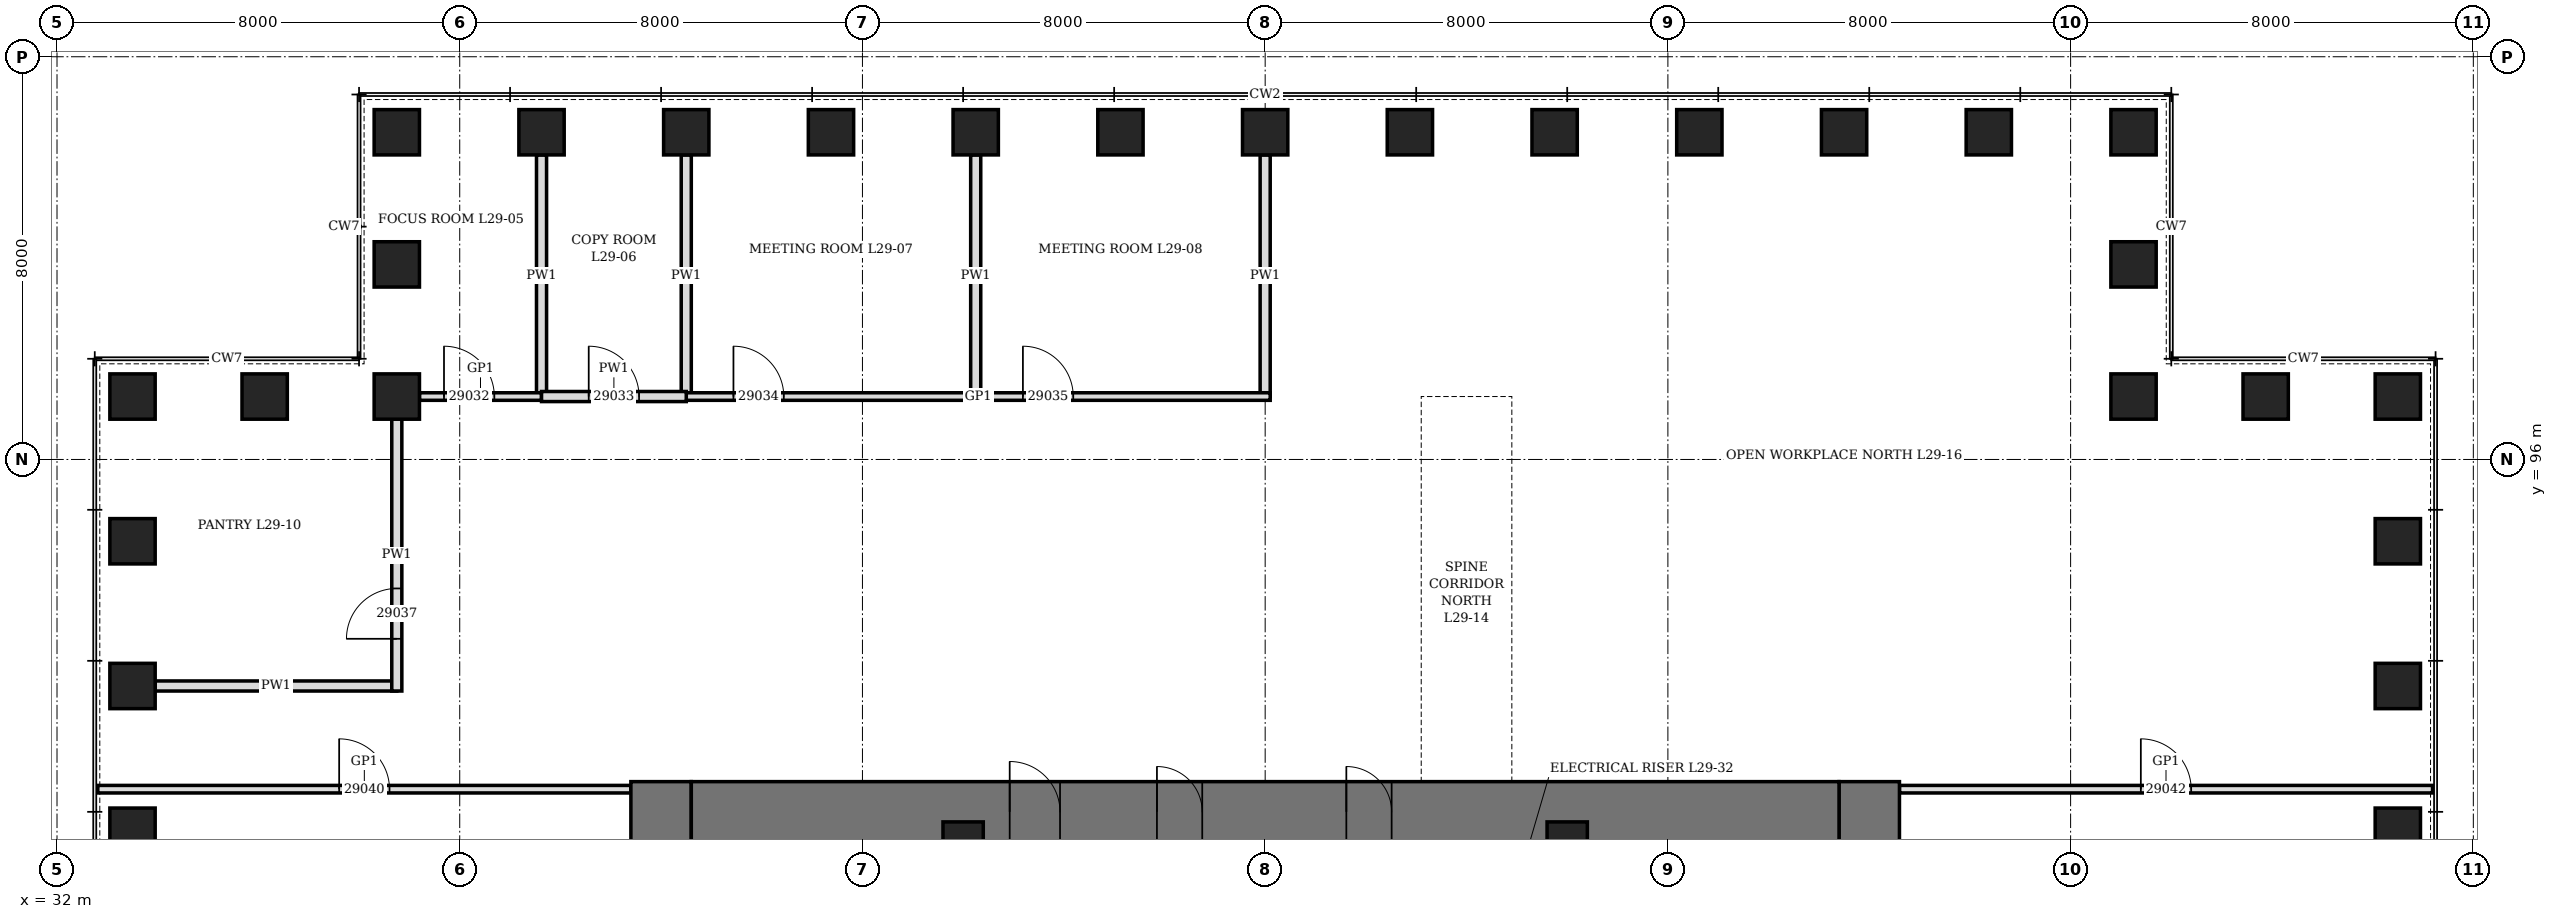
"""IFC4 building model, lengths in metres.
Left out: names, types, materials, properties, quantities, classifications, styles, units other than length and angle.
Written with IfcOpenShell. Run it as: python <this file> out.ifc"""

import sys

from ifc_helpers import new_model, si_unit, direction, frame, frame_2d, origin, origin_2d, place, context, subcontext, project, spatial, rectangle, hollow_rectangle, extrude, element, fill, save


model = new_model("IFC4")
c1 = context("Model", 3, precision=1e-05, world=origin(), true_north=direction((0.0, 1.0)))
c2 = subcontext(c1, "Body", "Model", "MODEL_VIEW")
j1 = project(units=[si_unit("LENGTHUNIT", "METRE"), si_unit("PLANEANGLEUNIT", "RADIAN")], contexts=[c1])
p1 = place(None, origin())
s1 = spatial("IfcSite", under=j1, at=p1, CompositionType="ELEMENT")
p2 = place(p1, origin())
s2 = spatial("IfcBuilding", under=s1, at=p2, CompositionType="ELEMENT")
p3 = place(p2, frame((0.0, 0.0, 133.3)))
s3 = spatial("IfcBuildingStorey", under=s2, at=p3, CompositionType="ELEMENT", Elevation=133.3)
for number, where, z_axis, x_axis in (
    (1, (78.5, 88.625, 0.0), (0.0, 0.0, 1.0), (0.0, 1.0, 0.0)),
    (2, (78.5, 91.5, 0.0), (0.0, 0.0, 1.0), (0.0, 1.0, 0.0)),
    (3, (78.5, 94.375, 0.0), (0.0, 0.0, 1.0), (0.0, 1.0, 0.0)),
    (4, (78.5, 97.25, 0.0), (0.0, 0.0, 1.0), (1.0, 0.0, 0.0)),
    (5, (75.875, 97.25, 0.0), (0.0, 0.0, 1.0), (1.0, 0.0, 0.0)),
    (6, (73.25, 97.25, 0.0), (0.0, 0.0, 1.0), (0.0, 1.0, 0.0)),
    (7, (73.25, 99.875, 0.0), (0.0, 0.0, 1.0), (0.0, 1.0, 0.0)),
    (8, (73.25, 102.5, 0.0), (0.0, 0.0, 1.0), (1.0, 0.0, 0.0)),
    (9, (70.375, 102.5, 0.0), (0.0, 0.0, 1.0), (1.0, 0.0, 0.0)),
    (10, (67.5, 102.5, 0.0), (0.0, 0.0, 1.0), (1.0, 0.0, 0.0)),
    (11, (64.625, 102.5, 0.0), (0.0, 0.0, 1.0), (1.0, 0.0, 0.0)),
    (12, (61.75, 102.5, 0.0), (0.0, 0.0, 1.0), (1.0, 0.0, 0.0)),
    (13, (58.875, 102.5, 0.0), (0.0, 0.0, 1.0), (1.0, 0.0, 0.0)),
    (14, (56.0, 102.5, 0.0), (0.0, 0.0, 1.0), (1.0, 0.0, 0.0)),
    (15, (53.125, 102.5, 0.0), (0.0, 0.0, 1.0), (1.0, 0.0, 0.0)),
    (16, (50.25, 102.5, 0.0), (0.0, 0.0, 1.0), (1.0, 0.0, 0.0)),
    (17, (47.375, 102.5, 0.0), (0.0, 0.0, 1.0), (1.0, 0.0, 0.0)),
    (18, (44.5, 102.5, 0.0), (0.0, 0.0, 1.0), (1.0, 0.0, 0.0)),
    (19, (41.625, 102.5, 0.0), (0.0, 0.0, 1.0), (1.0, 0.0, 0.0)),
    (20, (38.75, 102.5, 0.0), (0.0, 0.0, 1.0), (0.0, 1.0, 0.0)),
    (21, (38.75, 99.875, 0.0), (0.0, 0.0, 1.0), (0.0, 1.0, 0.0)),
    (22, (38.75, 97.25, 0.0), (0.0, 0.0, 1.0), (1.0, 0.0, 0.0)),
    (23, (36.125, 97.25, 0.0), (0.0, 0.0, 1.0), (1.0, 0.0, 0.0)),
    (24, (33.5, 97.25, 0.0), (0.0, 0.0, 1.0), (0.0, 1.0, 0.0)),
    (25, (33.5, 94.375, 0.0), (0.0, 0.0, 1.0), (0.0, 1.0, 0.0)),
    (26, (33.5, 91.5, 0.0), (0.0, 0.0, 1.0), (0.0, 1.0, 0.0)),
    (27, (33.5, 88.625, 0.0), (0.0, 0.0, 1.0), (0.0, 1.0, 0.0)),
):
    element("IfcColumn", number, at=place(p3, frame(where, z_axis=z_axis, x_axis=x_axis)), inside=s3, PredefinedType="COLUMN", context=c2, shape_type="SweptSolid", body=[
        extrude(hollow_rectangle(XDim=0.9, YDim=0.9, WallThickness=0.15, at=origin_2d()), origin(), (0.0, 0.0, 1.0), 4.2),
    ])
p4 = place(p3, frame((44.0, 70.4, 0.0), z_axis=(0.0, 0.0, 1.0), x_axis=(0.0, 1.0, 0.0)))
e28 = element("IfcWall", 28, at=p4, inside=s3, PredefinedType="SHEAR", context=c2, shape_type="SweptSolid", body=[
    extrude(rectangle(XDim=19.2, YDim=1.2, at=frame_2d((9.6, 0.0))), origin(), (0.0, 0.0, 1.0), 4.2),
])
p5 = place(p4, frame((8.6, 0.0, 0.0)))
e29 = element("IfcOpeningElement", 29, at=p5, cuts=e28, PredefinedType="OPENING", context=c2, shape_type="SweptSolid", body=[
    extrude(rectangle(XDim=2.0, YDim=2.4, at=frame_2d((1.0, 1.2))), frame((0.0, 0.61, 0.0), z_axis=(0.0, -1.0, 0.0), x_axis=(1.0, 0.0, 0.0)), (0.0, 0.0, 1.0), 1.22),
])
p6 = place(p3, frame((68.0, 70.4, 0.0), z_axis=(0.0, 0.0, 1.0), x_axis=(0.0, 1.0, 0.0)))
e30 = element("IfcWall", 30, at=p6, inside=s3, PredefinedType="SHEAR", context=c2, shape_type="SweptSolid", body=[
    extrude(rectangle(XDim=19.2, YDim=1.2, at=frame_2d((9.6, 0.0))), origin(), (0.0, 0.0, 1.0), 4.2),
])
p7 = place(p6, frame((8.6, 0.0, 0.0)))
e31 = element("IfcOpeningElement", 31, at=p7, cuts=e30, PredefinedType="OPENING", context=c2, shape_type="SweptSolid", body=[
    extrude(rectangle(XDim=2.0, YDim=2.4, at=frame_2d((1.0, 1.2))), frame((0.0, 0.61, 0.0), z_axis=(0.0, -1.0, 0.0), x_axis=(1.0, 0.0, 0.0)), (0.0, 0.0, 1.0), 1.22),
])
p8 = place(p3, frame((44.6, 89.0, 0.0), z_axis=(0.0, 0.0, 1.0), x_axis=(1.0, 0.0, 0.0)))
e32 = element("IfcWall", 32, at=p8, inside=s3, PredefinedType="SHEAR", context=c2, shape_type="SweptSolid", body=[
    extrude(rectangle(XDim=22.8, YDim=1.2, at=frame_2d((11.4, 0.0))), origin(), (0.0, 0.0, 1.0), 4.2),
])
p9 = place(p8, frame((6.325, 0.0, 0.0)))
e33 = element("IfcOpeningElement", 33, at=p9, cuts=e32, PredefinedType="OPENING", context=c2, shape_type="SweptSolid", body=[
    extrude(rectangle(XDim=1.0, YDim=2.1, at=frame_2d((0.5, 1.05))), frame((0.0, 0.61, 0.0), z_axis=(0.0, -1.0, 0.0), x_axis=(1.0, 0.0, 0.0)), (0.0, 0.0, 1.0), 1.22),
])
p10 = place(p8, frame((9.25, 0.0, 0.0)))
e34 = element("IfcOpeningElement", 34, at=p10, cuts=e32, PredefinedType="OPENING", context=c2, shape_type="SweptSolid", body=[
    extrude(rectangle(XDim=0.9, YDim=2.1, at=frame_2d((0.45, 1.05))), frame((0.0, 0.61, 0.0), z_axis=(0.0, -1.0, 0.0), x_axis=(1.0, 0.0, 0.0)), (0.0, 0.0, 1.0), 1.22),
])
p11 = place(p8, frame((13.012, 0.0, 0.0)))
e35 = element("IfcOpeningElement", 35, at=p11, cuts=e32, PredefinedType="OPENING", context=c2, shape_type="SweptSolid", body=[
    extrude(rectangle(XDim=0.9, YDim=2.1, at=frame_2d((0.45, 1.05))), frame((0.0, 0.61, 0.0), z_axis=(0.0, -1.0, 0.0), x_axis=(1.0, 0.0, 0.0)), (0.0, 0.0, 1.0), 1.22),
])
for number, where, z_axis, x_axis in (
    (36, (50.0, 88.4, 0.0), (0.0, 0.0, 1.0), (1.0, 0.0, 0.0)),
    (37, (62.0, 88.4, 0.0), (0.0, 0.0, 1.0), (1.0, 0.0, 0.0)),
):
    element("IfcColumn", number, at=place(p3, frame(where, z_axis=z_axis, x_axis=x_axis)), inside=s3, PredefinedType="COLUMN", context=c2, shape_type="SweptSolid", body=[
        extrude(hollow_rectangle(XDim=0.8, YDim=0.8, WallThickness=0.1, at=origin_2d()), origin(), (0.0, 0.0, 1.0), 4.2),
    ])
p12 = place(p3, frame((41.625, 97.25, 0.0), z_axis=(0.0, 0.0, 1.0), x_axis=(0.0, 1.0, 0.0)))
e38 = element("IfcWall", 38, at=p12, inside=s3, PredefinedType="PARTITIONING", context=c2, shape_type="SweptSolid", body=[
    extrude(rectangle(XDim=4.8, YDim=0.2, at=frame_2d((2.4, 0.0))), origin(), (0.0, 0.0, 1.0), 3.428),
])
p13 = place(p3, frame((44.5, 97.25, 0.0), z_axis=(0.0, 0.0, 1.0), x_axis=(0.0, 1.0, 0.0)))
e39 = element("IfcWall", 39, at=p13, inside=s3, PredefinedType="PARTITIONING", context=c2, shape_type="SweptSolid", body=[
    extrude(rectangle(XDim=4.8, YDim=0.2, at=frame_2d((2.4, 0.0))), origin(), (0.0, 0.0, 1.0), 2.74),
])
for number, where, z_axis, x_axis in (
    (40, (50.25, 97.25, 0.0), (0.0, 0.0, 1.0), (0.0, 1.0, 0.0)),
    (41, (56.0, 97.25, 0.0), (0.0, 0.0, 1.0), (0.0, 1.0, 0.0)),
):
    element("IfcWall", number, at=place(p3, frame(where, z_axis=z_axis, x_axis=x_axis)), inside=s3, PredefinedType="PARTITIONING", context=c2, shape_type="SweptSolid", body=[
        extrude(rectangle(XDim=4.8, YDim=0.2, at=frame_2d((2.4, 0.0))), origin(), (0.0, 0.0, 1.0), 3.278),
    ])
p14 = place(p3, frame((33.95, 91.5, 0.0), z_axis=(0.0, 0.0, 1.0), x_axis=(1.0, 0.0, 0.0)))
e42 = element("IfcWall", 42, at=p14, inside=s3, PredefinedType="PARTITIONING", context=c2, shape_type="SweptSolid", body=[
    extrude(rectangle(XDim=4.8, YDim=0.2, at=frame_2d((2.4, 0.0))), origin(), (0.0, 0.0, 1.0), 3.428),
])
p15 = place(p3, frame((32.81, 89.45, 0.0), z_axis=(0.0, 0.0, 1.0), x_axis=(1.0, 0.0, 0.0)))
e43 = element("IfcWall", 43, at=p15, inside=s3, PredefinedType="PARTITIONING", context=c2, shape_type="SweptSolid", body=[
    extrude(rectangle(XDim=10.59, YDim=0.15, at=frame_2d((5.295, 0.0))), origin(), (0.0, 0.0, 1.0), 4.04),
])
p16 = place(p15, frame((4.795, 0.0, 0.0)))
e44 = element("IfcOpeningElement", 44, at=p16, cuts=e43, PredefinedType="OPENING", context=c2, shape_type="SweptSolid", body=[
    extrude(rectangle(XDim=1.0, YDim=2.4, at=frame_2d((0.5, 1.2))), frame((0.0, 0.085, 0.0), z_axis=(0.0, -1.0, 0.0), x_axis=(1.0, 0.0, 0.0)), (0.0, 0.0, 1.0), 0.17),
])
p17 = place(p3, frame((68.6, 89.45, 0.0), z_axis=(0.0, 0.0, 1.0), x_axis=(1.0, 0.0, 0.0)))
e45 = element("IfcWall", 45, at=p17, inside=s3, PredefinedType="PARTITIONING", context=c2, shape_type="SweptSolid", body=[
    extrude(rectangle(XDim=10.59, YDim=0.15, at=frame_2d((5.295, 0.0))), origin(), (0.0, 0.0, 1.0), 4.04),
])
p18 = place(p17, frame((4.795, 0.0, 0.0)))
e46 = element("IfcOpeningElement", 46, at=p18, cuts=e45, PredefinedType="OPENING", context=c2, shape_type="SweptSolid", body=[
    extrude(rectangle(XDim=1.0, YDim=2.4, at=frame_2d((0.5, 1.2))), frame((0.0, 0.085, 0.0), z_axis=(0.0, -1.0, 0.0), x_axis=(1.0, 0.0, 0.0)), (0.0, 0.0, 1.0), 0.17),
])
p19 = place(p3, frame((39.2, 97.25, 0.0), z_axis=(0.0, 0.0, 1.0), x_axis=(1.0, 0.0, 0.0)))
e47 = element("IfcWall", 47, at=p19, inside=s3, PredefinedType="PARTITIONING", context=c2, shape_type="SweptSolid", body=[
    extrude(rectangle(XDim=2.425, YDim=0.15, at=frame_2d((1.212, 0.0))), origin(), (0.0, 0.0, 1.0), 4.04),
])
p20 = place(p19, frame((0.488, 0.0, 0.0)))
e48 = element("IfcOpeningElement", 48, at=p20, cuts=e47, PredefinedType="OPENING", context=c2, shape_type="SweptSolid", body=[
    extrude(rectangle(XDim=1.0, YDim=2.4, at=frame_2d((0.5, 1.2))), frame((0.0, 0.085, 0.0), z_axis=(0.0, -1.0, 0.0), x_axis=(1.0, 0.0, 0.0)), (0.0, 0.0, 1.0), 0.17),
])
p21 = place(p3, frame((44.5, 97.25, 0.0), z_axis=(0.0, 0.0, 1.0), x_axis=(1.0, 0.0, 0.0)))
e49 = element("IfcWall", 49, at=p21, inside=s3, PredefinedType="PARTITIONING", context=c2, shape_type="SweptSolid", body=[
    extrude(rectangle(XDim=11.6, YDim=0.15, at=frame_2d((5.8, 0.0))), origin(), (0.0, 0.0, 1.0), 4.04),
])
p22 = place(p21, frame((0.938, 0.0, 0.0)))
e50 = element("IfcOpeningElement", 50, at=p22, cuts=e49, PredefinedType="OPENING", context=c2, shape_type="SweptSolid", body=[
    extrude(rectangle(XDim=1.0, YDim=2.4, at=frame_2d((0.5, 1.2))), frame((0.0, 0.085, 0.0), z_axis=(0.0, -1.0, 0.0), x_axis=(1.0, 0.0, 0.0)), (0.0, 0.0, 1.0), 0.17),
])
p23 = place(p21, frame((6.688, 0.0, 0.0)))
e51 = element("IfcOpeningElement", 51, at=p23, cuts=e49, PredefinedType="OPENING", context=c2, shape_type="SweptSolid", body=[
    extrude(rectangle(XDim=1.0, YDim=2.4, at=frame_2d((0.5, 1.2))), frame((0.0, 0.085, 0.0), z_axis=(0.0, -1.0, 0.0), x_axis=(1.0, 0.0, 0.0)), (0.0, 0.0, 1.0), 0.17),
])
p24 = place(p3, frame((41.625, 97.25, 0.0), z_axis=(0.0, 0.0, 1.0), x_axis=(1.0, 0.0, 0.0)))
e52 = element("IfcWall", 52, at=p24, inside=s3, PredefinedType="PARTITIONING", context=c2, shape_type="SweptSolid", body=[
    extrude(rectangle(XDim=2.875, YDim=0.2, at=frame_2d((1.438, 0.0))), origin(), (0.0, 0.0, 1.0), 4.04),
])
p25 = place(p24, frame((0.938, 0.0, 0.0)))
e53 = element("IfcOpeningElement", 53, at=p25, cuts=e52, PredefinedType="OPENING", context=c2, shape_type="SweptSolid", body=[
    extrude(rectangle(XDim=1.0, YDim=2.1, at=frame_2d((0.5, 1.05))), frame((0.0, 0.11, 0.0), z_axis=(0.0, -1.0, 0.0), x_axis=(1.0, 0.0, 0.0)), (0.0, 0.0, 1.0), 0.22),
])
p26 = place(p3, frame((38.75, 91.4, 0.0), z_axis=(0.0, 0.0, 1.0), x_axis=(0.0, 1.0, 0.0)))
e54 = element("IfcWall", 54, at=p26, inside=s3, PredefinedType="PARTITIONING", context=c2, shape_type="SweptSolid", body=[
    extrude(rectangle(XDim=5.4, YDim=0.2, at=frame_2d((2.7, 0.0))), origin(), (0.0, 0.0, 1.0), 4.04),
])
p27 = place(p26, frame((1.038, 0.0, 0.0)))
e55 = element("IfcOpeningElement", 55, at=p27, cuts=e54, PredefinedType="OPENING", context=c2, shape_type="SweptSolid", body=[
    extrude(rectangle(XDim=1.0, YDim=2.1, at=frame_2d((0.5, 1.05))), frame((0.0, 0.11, 0.0), z_axis=(0.0, -1.0, 0.0), x_axis=(1.0, 0.0, 0.0)), (0.0, 0.0, 1.0), 0.22),
])
p28 = place(p9, origin())
e56 = element("IfcDoor", 56, at=p28, inside=s3, OperationType="SINGLE_SWING_LEFT", PredefinedType="DOOR", context=c2, shape_type="SweptSolid", body=[
    extrude(rectangle(XDim=1.0, YDim=2.1, at=frame_2d((0.5, 1.05))), frame((0.0, 0.35, 0.0), z_axis=(0.0, -1.0, 0.0), x_axis=(1.0, 0.0, 0.0)), (0.0, 0.0, 1.0), 0.7),
])
fill(e33, e56)
p29 = place(p10, origin())
e57 = element("IfcDoor", 57, at=p29, inside=s3, OperationType="SINGLE_SWING_LEFT", PredefinedType="DOOR", context=c2, shape_type="SweptSolid", body=[
    extrude(rectangle(XDim=0.9, YDim=2.1, at=frame_2d((0.45, 1.05))), frame((0.0, 0.35, 0.0), z_axis=(0.0, -1.0, 0.0), x_axis=(1.0, 0.0, 0.0)), (0.0, 0.0, 1.0), 0.7),
])
fill(e34, e57)
p30 = place(p11, origin())
e58 = element("IfcDoor", 58, at=p30, inside=s3, OperationType="SINGLE_SWING_LEFT", PredefinedType="DOOR", context=c2, shape_type="SweptSolid", body=[
    extrude(rectangle(XDim=0.9, YDim=2.1, at=frame_2d((0.45, 1.05))), frame((0.0, 0.35, 0.0), z_axis=(0.0, -1.0, 0.0), x_axis=(1.0, 0.0, 0.0)), (0.0, 0.0, 1.0), 0.7),
])
fill(e35, e58)
p31 = place(p20, origin())
e59 = element("IfcDoor", 59, at=p31, inside=s3, OperationType="SINGLE_SWING_RIGHT", PredefinedType="DOOR", context=c2, shape_type="SweptSolid", body=[
    extrude(rectangle(XDim=1.0, YDim=2.4, at=frame_2d((0.5, 1.2))), frame((0.0, 0.075, 0.0), z_axis=(0.0, -1.0, 0.0), x_axis=(1.0, 0.0, 0.0)), (0.0, 0.0, 1.0), 0.149),
])
fill(e48, e59)
p32 = place(p25, origin())
e60 = element("IfcDoor", 60, at=p32, inside=s3, OperationType="SINGLE_SWING_LEFT", PredefinedType="DOOR", context=c2, shape_type="SweptSolid", body=[
    extrude(rectangle(XDim=1.0, YDim=2.1, at=frame_2d((0.5, 1.05))), frame((0.0, 0.1, 0.0), z_axis=(0.0, -1.0, 0.0), x_axis=(1.0, 0.0, 0.0)), (0.0, 0.0, 1.0), 0.199),
])
fill(e53, e60)
p33 = place(p22, origin())
e61 = element("IfcDoor", 61, at=p33, inside=s3, OperationType="SINGLE_SWING_RIGHT", PredefinedType="DOOR", context=c2, shape_type="SweptSolid", body=[
    extrude(rectangle(XDim=1.0, YDim=2.4, at=frame_2d((0.5, 1.2))), frame((0.0, 0.075, 0.0), z_axis=(0.0, -1.0, 0.0), x_axis=(1.0, 0.0, 0.0)), (0.0, 0.0, 1.0), 0.149),
])
fill(e50, e61)
p34 = place(p23, origin())
e62 = element("IfcDoor", 62, at=p34, inside=s3, OperationType="SINGLE_SWING_RIGHT", PredefinedType="DOOR", context=c2, shape_type="SweptSolid", body=[
    extrude(rectangle(XDim=1.0, YDim=2.4, at=frame_2d((0.5, 1.2))), frame((0.0, 0.075, 0.0), z_axis=(0.0, -1.0, 0.0), x_axis=(1.0, 0.0, 0.0)), (0.0, 0.0, 1.0), 0.149),
])
fill(e51, e62)
p35 = place(p27, origin())
e63 = element("IfcDoor", 63, at=p35, inside=s3, OperationType="SINGLE_SWING_LEFT", PredefinedType="DOOR", context=c2, shape_type="SweptSolid", body=[
    extrude(rectangle(XDim=1.0, YDim=2.1, at=frame_2d((0.5, 1.05))), frame((0.0, 0.1, 0.0), z_axis=(0.0, -1.0, 0.0), x_axis=(1.0, 0.0, 0.0)), (0.0, 0.0, 1.0), 0.199),
])
fill(e55, e63)
p36 = place(p16, origin())
e64 = element("IfcDoor", 64, at=p36, inside=s3, OperationType="SINGLE_SWING_RIGHT", PredefinedType="DOOR", context=c2, shape_type="SweptSolid", body=[
    extrude(rectangle(XDim=1.0, YDim=2.4, at=frame_2d((0.5, 1.2))), frame((0.0, 0.075, 0.0), z_axis=(0.0, -1.0, 0.0), x_axis=(1.0, 0.0, 0.0)), (0.0, 0.0, 1.0), 0.149),
])
fill(e44, e64)
p37 = place(p18, origin())
e65 = element("IfcDoor", 65, at=p37, inside=s3, OperationType="SINGLE_SWING_RIGHT", PredefinedType="DOOR", context=c2, shape_type="SweptSolid", body=[
    extrude(rectangle(XDim=1.0, YDim=2.4, at=frame_2d((0.5, 1.2))), frame((0.0, 0.075, 0.0), z_axis=(0.0, -1.0, 0.0), x_axis=(1.0, 0.0, 0.0)), (0.0, 0.0, 1.0), 0.149),
])
fill(e46, e65)
save(model, sys.argv[1])
